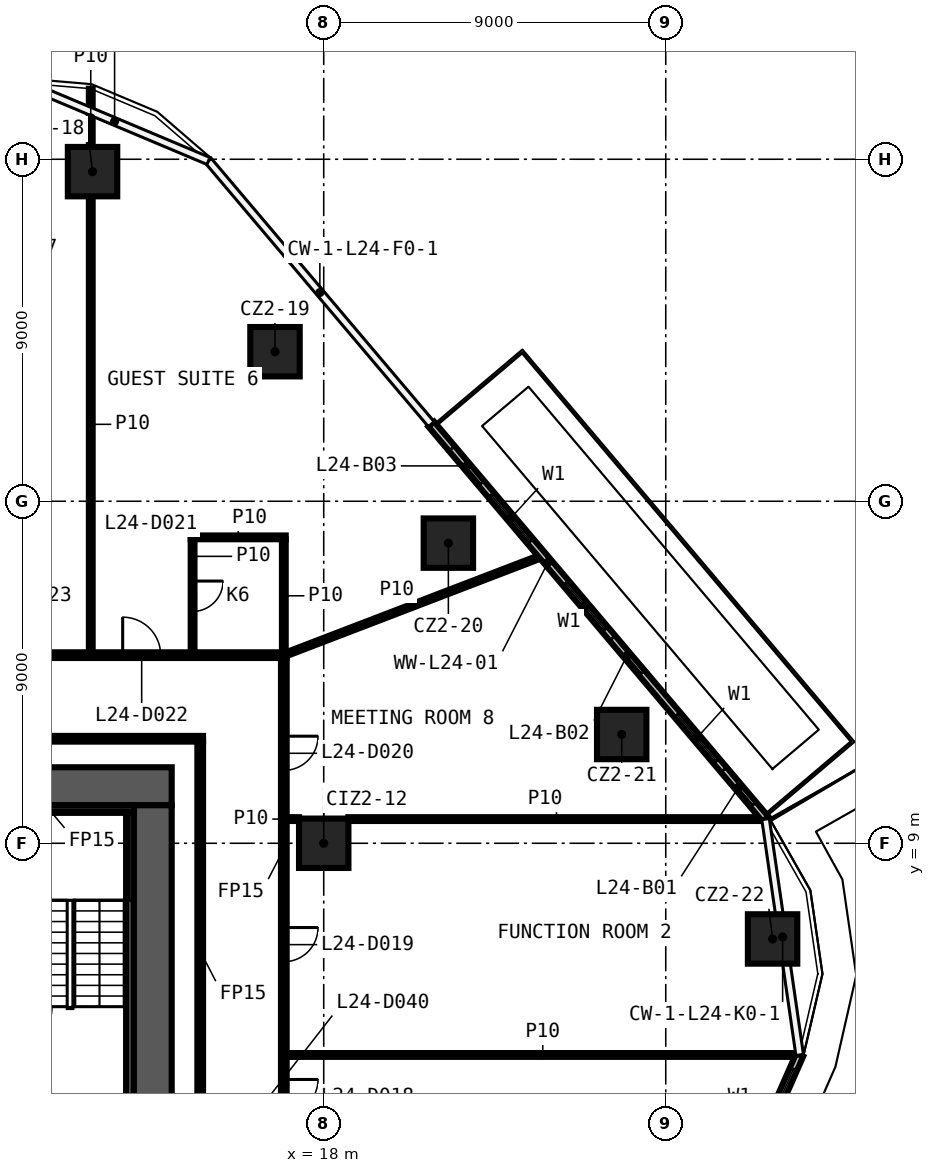
"""IFC4 building model, lengths in metres.
Left out: names, types, materials, properties, quantities, classifications, styles, units other than length and angle.
Written with IfcOpenShell. Run it as: python <this file> out.ifc"""

import sys

from ifc_helpers import new_model, si_unit, direction, frame, frame_2d, origin, origin_2d, place, context, subcontext, project, spatial, rectangle, extrude, element, fill, save


model = new_model("IFC4")
c1 = context("Model", 3, precision=1e-05, world=origin(), true_north=direction((0.0, 1.0)))
c2 = subcontext(c1, "Body", "Model", "MODEL_VIEW")
j1 = project(units=[si_unit("LENGTHUNIT", "METRE"), si_unit("PLANEANGLEUNIT", "RADIAN")], contexts=[c1])
p1 = place(None, origin())
s1 = spatial("IfcSite", under=j1, at=p1, CompositionType="ELEMENT")
p2 = place(p1, origin())
s2 = spatial("IfcBuilding", under=s1, at=p2, CompositionType="ELEMENT")
p3 = place(p2, frame((0.0, 0.0, 113.7)))
s3 = spatial("IfcBuildingStorey", under=s2, at=p3, CompositionType="ELEMENT", Elevation=113.7)
for number, where, z_axis, x_axis in (
    (1, (11.917, 26.674, 0.0), (0.0, 0.0, 1.0), (1.0, 0.0, 0.0)),
    (2, (16.718, 21.935, 0.0), (0.0, 0.0, 1.0), (1.0, 0.0, 0.0)),
    (3, (21.28, 16.898, 0.0), (0.0, 0.0, 1.0), (1.0, 0.0, 0.0)),
    (4, (25.841, 11.862, 0.0), (0.0, 0.0, 1.0), (1.0, 0.0, 0.0)),
    (5, (29.811, 6.482, 0.0), (0.0, 0.0, 1.0), (1.0, 0.0, 0.0)),
    (6, (18.0, 9.0, 0.0), (0.0, 0.0, 1.0), (1.0, 0.0, 0.0)),
):
    element("IfcColumn", number, at=place(p3, frame(where, z_axis=z_axis, x_axis=x_axis)), inside=s3, PredefinedType="COLUMN", context=c2, shape_type="SweptSolid", body=[
        extrude(rectangle(XDim=1.3, YDim=1.3, at=origin_2d()), origin(), (0.0, 0.0, 1.0), 3.3),
    ])
p4 = place(p3, frame((17.025, 3.429, 0.0), z_axis=(0.0, 0.0, 1.0), x_axis=(1.0, 0.0, 0.0)))
e7 = element("IfcWall", 7, at=p4, inside=s3, PredefinedType="PARTITIONING", context=c2, shape_type="SweptSolid", body=[
    extrude(rectangle(XDim=13.477, YDim=0.1, at=frame_2d((6.739, 0.0))), origin(), (0.0, 0.0, 1.0), 3.3),
])
p5 = place(p3, frame((17.025, 9.636, 0.0), z_axis=(0.0, 0.0, 1.0), x_axis=(1.0, 0.0, 0.0)))
e8 = element("IfcWall", 8, at=p5, inside=s3, PredefinedType="PARTITIONING", context=c2, shape_type="SweptSolid", body=[
    extrude(rectangle(XDim=0.325, YDim=0.1, at=frame_2d((0.163, 0.0))), origin(), (0.0, 0.0, 1.0), 3.3),
])
p6 = place(p3, frame((18.65, 9.636, 0.0), z_axis=(0.0, 0.0, 1.0), x_axis=(1.0, 0.0, 0.0)))
e9 = element("IfcWall", 9, at=p6, inside=s3, PredefinedType="PARTITIONING", context=c2, shape_type="SweptSolid", body=[
    extrude(rectangle(XDim=10.95, YDim=0.1, at=frame_2d((5.475, 0.0))), origin(), (0.0, 0.0, 1.0), 3.3),
])
p7 = place(p3, frame((3.6, 11.75, 0.0), z_axis=(0.0, 0.0, 1.0), x_axis=(1.0, 0.0, 0.0)))
e10 = element("IfcWall", 10, at=p7, inside=s3, PredefinedType="PARTITIONING", context=c2, shape_type="SweptSolid", body=[
    extrude(rectangle(XDim=11.225, YDim=0.15, at=frame_2d((5.612, 0.0))), origin(), (0.0, 0.0, 1.0), 3.3),
])
p8 = place(p3, frame((-17.025, 13.95, 0.0), z_axis=(0.0, 0.0, 1.0), x_axis=(1.0, 0.0, 0.0)))
e11 = element("IfcWall", 11, at=p8, inside=s3, PredefinedType="PARTITIONING", context=c2, shape_type="SweptSolid", body=[
    extrude(rectangle(XDim=34.05, YDim=0.15, at=frame_2d((17.025, 0.0))), origin(), (0.0, 0.0, 1.0), 3.3),
])
p9 = place(p8, frame((29.735, 0.0, 0.0)))
e12 = element("IfcOpeningElement", 12, at=p9, cuts=e11, PredefinedType="OPENING", context=c2, shape_type="SweptSolid", body=[
    extrude(rectangle(XDim=1.0, YDim=2.1, at=frame_2d((0.5, 1.05))), frame((0.0, 0.085, 0.0), z_axis=(0.0, -1.0, 0.0), x_axis=(1.0, 0.0, 0.0)), (0.0, 0.0, 1.0), 0.17),
])
p10 = place(p8, frame((25.513, 0.0, 0.0)))
e13 = element("IfcOpeningElement", 13, at=p10, cuts=e11, PredefinedType="OPENING", context=c2, shape_type="SweptSolid", body=[
    extrude(rectangle(XDim=1.0, YDim=2.1, at=frame_2d((0.5, 1.05))), frame((0.0, 0.085, 0.0), z_axis=(0.0, -1.0, 0.0), x_axis=(1.0, 0.0, 0.0)), (0.0, 0.0, 1.0), 0.17),
])
p11 = place(p8, frame((18.631, 0.0, 0.0)))
e14 = element("IfcOpeningElement", 14, at=p11, cuts=e11, PredefinedType="OPENING", context=c2, shape_type="SweptSolid", body=[
    extrude(rectangle(XDim=1.0, YDim=2.1, at=frame_2d((0.5, 1.05))), frame((0.0, 0.085, 0.0), z_axis=(0.0, -1.0, 0.0), x_axis=(1.0, 0.0, 0.0)), (0.0, 0.0, 1.0), 0.17),
])
p12 = place(p8, frame((16.545, 0.0, 0.0)))
e15 = element("IfcOpeningElement", 15, at=p12, cuts=e11, PredefinedType="OPENING", context=c2, shape_type="SweptSolid", body=[
    extrude(rectangle(XDim=1.0, YDim=2.1, at=frame_2d((0.5, 1.05))), frame((0.0, 0.085, 0.0), z_axis=(0.0, -1.0, 0.0), x_axis=(1.0, 0.0, 0.0)), (0.0, 0.0, 1.0), 0.17),
])
p13 = place(p8, frame((9.659, 0.0, 0.0)))
e16 = element("IfcOpeningElement", 16, at=p13, cuts=e11, PredefinedType="OPENING", context=c2, shape_type="SweptSolid", body=[
    extrude(rectangle(XDim=1.0, YDim=2.1, at=frame_2d((0.5, 1.05))), frame((0.0, 0.085, 0.0), z_axis=(0.0, -1.0, 0.0), x_axis=(1.0, 0.0, 0.0)), (0.0, 0.0, 1.0), 0.17),
])
p14 = place(p8, frame((7.577, 0.0, 0.0)))
e17 = element("IfcOpeningElement", 17, at=p14, cuts=e11, PredefinedType="OPENING", context=c2, shape_type="SweptSolid", body=[
    extrude(rectangle(XDim=1.0, YDim=2.1, at=frame_2d((0.5, 1.05))), frame((0.0, 0.085, 0.0), z_axis=(0.0, -1.0, 0.0), x_axis=(1.0, 0.0, 0.0)), (0.0, 0.0, 1.0), 0.17),
])
p15 = place(p8, frame((2.381, 0.0, 0.0)))
e18 = element("IfcOpeningElement", 18, at=p15, cuts=e11, PredefinedType="OPENING", context=c2, shape_type="SweptSolid", body=[
    extrude(rectangle(XDim=0.9, YDim=2.1, at=frame_2d((0.45, 1.05))), frame((0.0, 0.085, 0.0), z_axis=(0.0, -1.0, 0.0), x_axis=(1.0, 0.0, 0.0)), (0.0, 0.0, 1.0), 0.17),
])
p16 = place(p3, frame((14.5, 17.05, 0.0), z_axis=(0.0, 0.0, 1.0), x_axis=(1.0, 0.0, 0.0)))
e19 = element("IfcWall", 19, at=p16, inside=s3, PredefinedType="PARTITIONING", context=c2, shape_type="SweptSolid", body=[
    extrude(rectangle(XDim=2.5, YDim=0.1, at=frame_2d((1.25, 0.0))), origin(), (0.0, 0.0, 1.0), 3.3),
])
p17 = place(p3, frame((16.95, 13.95, 0.0), z_axis=(0.0, 0.0, 1.0), x_axis=(0.933635037811, 0.358225649796, 0.0)))
e20 = element("IfcWall", 20, at=p17, inside=s3, PredefinedType="PARTITIONING", context=c2, shape_type="SweptSolid", body=[
    extrude(rectangle(XDim=7.275, YDim=0.1, at=frame_2d((3.638, 0.0))), origin(), (0.0, 0.0, 1.0), 3.3),
])
p18 = place(p3, frame((16.95, 13.875, 0.0), z_axis=(0.0, 0.0, 1.0), x_axis=(0.0, -1.0, 0.0)))
e21 = element("IfcWall", 21, at=p18, inside=s3, PredefinedType="PARTITIONING", context=c2, shape_type="SweptSolid", body=[
    extrude(rectangle(XDim=27.75, YDim=0.15, at=frame_2d((13.875, 0.0))), origin(), (0.0, 0.0, 1.0), 3.3),
])
p19 = place(p18, frame((24.917, 0.0, 0.0)))
e22 = element("IfcOpeningElement", 22, at=p19, cuts=e21, PredefinedType="OPENING", context=c2, shape_type="SweptSolid", body=[
    extrude(rectangle(XDim=0.9, YDim=2.1, at=frame_2d((0.45, 1.05))), frame((0.0, 0.085, 0.0), z_axis=(0.0, -1.0, 0.0), x_axis=(1.0, 0.0, 0.0)), (0.0, 0.0, 1.0), 0.17),
])
p20 = place(p18, frame((20.086, 0.0, 0.0)))
e23 = element("IfcOpeningElement", 23, at=p20, cuts=e21, PredefinedType="OPENING", context=c2, shape_type="SweptSolid", body=[
    extrude(rectangle(XDim=0.9, YDim=2.1, at=frame_2d((0.45, 1.05))), frame((0.0, 0.085, 0.0), z_axis=(0.0, -1.0, 0.0), x_axis=(1.0, 0.0, 0.0)), (0.0, 0.0, 1.0), 0.17),
])
p21 = place(p18, frame((16.047, 0.0, 0.0)))
e24 = element("IfcOpeningElement", 24, at=p21, cuts=e21, PredefinedType="OPENING", context=c2, shape_type="SweptSolid", body=[
    extrude(rectangle(XDim=0.9, YDim=2.1, at=frame_2d((0.45, 1.05))), frame((0.0, 0.085, 0.0), z_axis=(0.0, -1.0, 0.0), x_axis=(1.0, 0.0, 0.0)), (0.0, 0.0, 1.0), 0.17),
])
p22 = place(p18, frame((11.091, 0.0, 0.0)))
e25 = element("IfcOpeningElement", 25, at=p22, cuts=e21, PredefinedType="OPENING", context=c2, shape_type="SweptSolid", body=[
    extrude(rectangle(XDim=0.9, YDim=2.1, at=frame_2d((0.45, 1.05))), frame((0.0, 0.085, 0.0), z_axis=(0.0, -1.0, 0.0), x_axis=(1.0, 0.0, 0.0)), (0.0, 0.0, 1.0), 0.17),
])
p23 = place(p18, frame((7.093, 0.0, 0.0)))
e26 = element("IfcOpeningElement", 26, at=p23, cuts=e21, PredefinedType="OPENING", context=c2, shape_type="SweptSolid", body=[
    extrude(rectangle(XDim=0.9, YDim=2.1, at=frame_2d((0.45, 1.05))), frame((0.0, 0.085, 0.0), z_axis=(0.0, -1.0, 0.0), x_axis=(1.0, 0.0, 0.0)), (0.0, 0.0, 1.0), 0.17),
])
p24 = place(p18, frame((2.057, 0.0, 0.0)))
e27 = element("IfcOpeningElement", 27, at=p24, cuts=e21, PredefinedType="OPENING", context=c2, shape_type="SweptSolid", body=[
    extrude(rectangle(XDim=0.9, YDim=2.1, at=frame_2d((0.45, 1.05))), frame((0.0, 0.085, 0.0), z_axis=(0.0, -1.0, 0.0), x_axis=(1.0, 0.0, 0.0)), (0.0, 0.0, 1.0), 0.17),
])
p25 = place(p3, frame((16.95, 14.025, 0.0), z_axis=(0.0, 0.0, 1.0), x_axis=(0.0, 1.0, 0.0)))
e28 = element("IfcWall", 28, at=p25, inside=s3, PredefinedType="PARTITIONING", context=c2, shape_type="SweptSolid", body=[
    extrude(rectangle(XDim=2.975, YDim=0.1, at=frame_2d((1.488, 0.0))), origin(), (0.0, 0.0, 1.0), 3.3),
])
p26 = place(p3, frame((14.75, -11.675, 0.0), z_axis=(0.0, 0.0, 1.0), x_axis=(0.0, 1.0, 0.0)))
e29 = element("IfcWall", 29, at=p26, inside=s3, PredefinedType="PARTITIONING", context=c2, shape_type="SweptSolid", body=[
    extrude(rectangle(XDim=23.35, YDim=0.15, at=frame_2d((11.675, 0.0))), origin(), (0.0, 0.0, 1.0), 3.3),
])
p27 = place(p26, frame((11.225, 0.0, 0.0)))
e30 = element("IfcOpeningElement", 30, at=p27, cuts=e29, PredefinedType="OPENING", context=c2, shape_type="SweptSolid", body=[
    extrude(rectangle(XDim=0.9, YDim=2.1, at=frame_2d((0.45, 1.05))), frame((0.0, 0.085, 0.0), z_axis=(0.0, -1.0, 0.0), x_axis=(1.0, 0.0, 0.0)), (0.0, 0.0, 1.0), 0.17),
])
p28 = place(p3, frame((14.55, 17.0, 0.0), z_axis=(0.0, 0.0, 1.0), x_axis=(0.0, -1.0, 0.0)))
e31 = element("IfcWall", 31, at=p28, inside=s3, PredefinedType="PARTITIONING", context=c2, shape_type="SweptSolid", body=[
    extrude(rectangle(XDim=2.975, YDim=0.1, at=frame_2d((1.488, 0.0))), origin(), (0.0, 0.0, 1.0), 3.3),
])
p29 = place(p28, frame((1.1, 0.0, 0.0)))
e32 = element("IfcOpeningElement", 32, at=p29, cuts=e31, PredefinedType="OPENING", context=c2, shape_type="SweptSolid", body=[
    extrude(rectangle(XDim=0.8, YDim=2.1, at=frame_2d((0.4, 1.05))), frame((0.0, 0.06, 0.0), z_axis=(0.0, -1.0, 0.0), x_axis=(1.0, 0.0, 0.0)), (0.0, 0.0, 1.0), 0.12),
])
p30 = place(p3, frame((11.87, 14.025, 0.0), z_axis=(0.0, 0.0, 1.0), x_axis=(0.0, 1.0, 0.0)))
e33 = element("IfcWall", 33, at=p30, inside=s3, PredefinedType="PARTITIONING", context=c2, shape_type="SweptSolid", body=[
    extrude(rectangle(XDim=11.999, YDim=0.1, at=frame_2d((6.0, 0.0))), origin(), (0.0, 0.0, 1.0), 3.3),
])
p31 = place(p3, frame((11.87, 27.324, 0.0), z_axis=(0.0, 0.0, 1.0), x_axis=(0.0, 1.0, 0.0)))
e34 = element("IfcWall", 34, at=p31, inside=s3, PredefinedType="PARTITIONING", context=c2, shape_type="SweptSolid", body=[
    extrude(rectangle(XDim=1.531, YDim=0.1, at=frame_2d((0.766, 0.0))), origin(), (0.0, 0.0, 1.0), 3.3),
])
p32 = place(p3, frame((29.626, 9.636, 0.0), z_axis=(0.0, 0.0, 1.0), x_axis=(-0.6460547702, 0.763291054514, 0.0)))
e35 = element("IfcWall", 35, at=p32, inside=s3, PredefinedType="SOLIDWALL", context=c2, shape_type="SweptSolid", body=[
    extrude(rectangle(XDim=13.615, YDim=0.2, at=frame_2d((6.808, 0.0))), origin(), (0.0, 0.0, 1.0), 3.3),
])
p33 = place(p32, frame((2.0, 0.0, 0.6)))
e36 = element("IfcOpeningElement", 36, at=p33, cuts=e35, PredefinedType="OPENING", context=c2, shape_type="SweptSolid", body=[
    extrude(rectangle(XDim=1.6, YDim=2.4, at=frame_2d((0.8, 1.2))), frame((0.0, 0.11, 0.0), z_axis=(0.0, -1.0, 0.0), x_axis=(1.0, 0.0, 0.0)), (0.0, 0.0, 1.0), 0.22),
])
p34 = place(p32, frame((0.5, 0.0, 0.0)))
e37 = element("IfcOpeningElement", 37, at=p34, cuts=e35, PredefinedType="OPENING", context=c2, shape_type="SweptSolid", body=[
    extrude(rectangle(XDim=1.2, YDim=2.4, at=frame_2d((0.6, 1.2))), frame((0.0, 0.11, 0.0), z_axis=(0.0, -1.0, 0.0), x_axis=(1.0, 0.0, 0.0)), (0.0, 0.0, 1.0), 0.22),
])
p35 = place(p32, frame((6.538, 0.0, 0.6)))
e38 = element("IfcOpeningElement", 38, at=p35, cuts=e35, PredefinedType="OPENING", context=c2, shape_type="SweptSolid", body=[
    extrude(rectangle(XDim=1.6, YDim=2.4, at=frame_2d((0.8, 1.2))), frame((0.0, 0.11, 0.0), z_axis=(0.0, -1.0, 0.0), x_axis=(1.0, 0.0, 0.0)), (0.0, 0.0, 1.0), 0.22),
])
p36 = place(p32, frame((5.038, 0.0, 0.0)))
e39 = element("IfcOpeningElement", 39, at=p36, cuts=e35, PredefinedType="OPENING", context=c2, shape_type="SweptSolid", body=[
    extrude(rectangle(XDim=1.2, YDim=2.4, at=frame_2d((0.6, 1.2))), frame((0.0, 0.11, 0.0), z_axis=(0.0, -1.0, 0.0), x_axis=(1.0, 0.0, 0.0)), (0.0, 0.0, 1.0), 0.22),
])
p37 = place(p32, frame((9.577, 0.0, 0.6)))
e40 = element("IfcOpeningElement", 40, at=p37, cuts=e35, PredefinedType="OPENING", context=c2, shape_type="SweptSolid", body=[
    extrude(rectangle(XDim=1.6, YDim=2.4, at=frame_2d((0.8, 1.2))), frame((0.0, 0.11, 0.0), z_axis=(0.0, -1.0, 0.0), x_axis=(1.0, 0.0, 0.0)), (0.0, 0.0, 1.0), 0.22),
])
p38 = place(p32, frame((11.577, 0.0, 0.0)))
e41 = element("IfcOpeningElement", 41, at=p38, cuts=e35, PredefinedType="OPENING", context=c2, shape_type="SweptSolid", body=[
    extrude(rectangle(XDim=1.2, YDim=2.4, at=frame_2d((0.6, 1.2))), frame((0.0, 0.11, 0.0), z_axis=(0.0, -1.0, 0.0), x_axis=(1.0, 0.0, 0.0)), (0.0, 0.0, 1.0), 0.22),
])
p39 = place(p3, frame((28.748, -0.602, 0.0), z_axis=(0.0, 0.0, 1.0), x_axis=(0.403256746057, 0.91508687935, 0.0)))
e42 = element("IfcWall", 42, at=p39, inside=s3, PredefinedType="SOLIDWALL", context=c2, shape_type="SweptSolid", body=[
    extrude(rectangle(XDim=4.405, YDim=0.2, at=frame_2d((2.203, 0.0))), origin(), (0.0, 0.0, 1.0), 3.3),
])
p40 = place(p39, frame((2.4, 0.0, 0.6)))
e43 = element("IfcOpeningElement", 43, at=p40, cuts=e42, PredefinedType="OPENING", context=c2, shape_type="SweptSolid", body=[
    extrude(rectangle(XDim=1.6, YDim=2.4, at=frame_2d((0.8, 1.2))), frame((0.0, 0.11, 0.0), z_axis=(0.0, -1.0, 0.0), x_axis=(1.0, 0.0, 0.0)), (0.0, 0.0, 1.0), 0.22),
])
p41 = place(p39, frame((0.9, 0.0, 0.0)))
e44 = element("IfcOpeningElement", 44, at=p41, cuts=e42, PredefinedType="OPENING", context=c2, shape_type="SweptSolid", body=[
    extrude(rectangle(XDim=1.2, YDim=2.4, at=frame_2d((0.6, 1.2))), frame((0.0, 0.11, 0.0), z_axis=(0.0, -1.0, 0.0), x_axis=(1.0, 0.0, 0.0)), (0.0, 0.0, 1.0), 0.22),
])
p42 = place(p3, frame((-14.0, 10.5, 0.0), z_axis=(0.0, 0.0, 1.0), x_axis=(1.0, 0.0, 0.0)))
e45 = element("IfcWall", 45, at=p42, inside=s3, PredefinedType="SHEAR", context=c2, shape_type="SweptSolid", body=[
    extrude(rectangle(XDim=28.0, YDim=1.0, at=frame_2d((14.0, 0.0))), origin(), (0.0, 0.0, 1.0), 3.3),
])
p43 = place(p42, frame((15.9, 0.0, 0.0)))
e46 = element("IfcOpeningElement", 46, at=p43, cuts=e45, PredefinedType="OPENING", context=c2, shape_type="SweptSolid", body=[
    extrude(rectangle(XDim=1.6, YDim=2.1, at=frame_2d((0.8, 1.05))), frame((0.0, 0.51, 0.0), z_axis=(0.0, -1.0, 0.0), x_axis=(1.0, 0.0, 0.0)), (0.0, 0.0, 1.0), 1.02),
])
p44 = place(p3, frame((13.5, 10.0, 0.0), z_axis=(0.0, 0.0, 1.0), x_axis=(0.0, -1.0, 0.0)))
e47 = element("IfcWall", 47, at=p44, inside=s3, PredefinedType="SHEAR", context=c2, shape_type="SweptSolid", body=[
    extrude(rectangle(XDim=20.0, YDim=1.0, at=frame_2d((10.0, 0.0))), origin(), (0.0, 0.0, 1.0), 3.3),
])
p45 = place(p3, frame((3.9, 9.9, 0.0), z_axis=(0.0, 0.0, 1.0), x_axis=(1.0, 0.0, 0.0)))
e48 = element("IfcWall", 48, at=p45, inside=s3, PredefinedType="SHEAR", context=c2, shape_type="SweptSolid", body=[
    extrude(rectangle(XDim=9.1, YDim=0.2, at=frame_2d((4.55, 0.0))), origin(), (0.0, 0.0, 1.0), 3.3),
])
p46 = place(p3, frame((12.9, 9.8, 0.0), z_axis=(0.0, 0.0, 1.0), x_axis=(0.0, -1.0, 0.0)))
e49 = element("IfcWall", 49, at=p46, inside=s3, PredefinedType="SHEAR", context=c2, shape_type="SweptSolid", body=[
    extrude(rectangle(XDim=19.6, YDim=0.2, at=frame_2d((9.8, 0.0))), origin(), (0.0, 0.0, 1.0), 3.3),
])
p47 = place(p22, origin())
e50 = element("IfcDoor", 50, at=p47, inside=s3, OperationType="SINGLE_SWING_LEFT", PredefinedType="DOOR", context=c2, shape_type="SweptSolid", body=[
    extrude(rectangle(XDim=0.9, YDim=2.1, at=frame_2d((0.45, 1.05))), frame((0.0, 0.025, 0.0), z_axis=(0.0, -1.0, 0.0), x_axis=(1.0, 0.0, 0.0)), (0.0, 0.0, 1.0), 0.05),
])
fill(e25, e50)
p48 = place(p23, origin())
e51 = element("IfcDoor", 51, at=p48, inside=s3, OperationType="SINGLE_SWING_RIGHT", PredefinedType="DOOR", context=c2, shape_type="SweptSolid", body=[
    extrude(rectangle(XDim=0.9, YDim=2.1, at=frame_2d((0.45, 1.05))), frame((0.0, 0.025, 0.0), z_axis=(0.0, -1.0, 0.0), x_axis=(1.0, 0.0, 0.0)), (0.0, 0.0, 1.0), 0.05),
])
fill(e26, e51)
p49 = place(p24, origin())
e52 = element("IfcDoor", 52, at=p49, inside=s3, OperationType="SINGLE_SWING_LEFT", PredefinedType="DOOR", context=c2, shape_type="SweptSolid", body=[
    extrude(rectangle(XDim=0.9, YDim=2.1, at=frame_2d((0.45, 1.05))), frame((0.0, 0.025, 0.0), z_axis=(0.0, -1.0, 0.0), x_axis=(1.0, 0.0, 0.0)), (0.0, 0.0, 1.0), 0.05),
])
fill(e27, e52)
p50 = place(p29, origin())
e53 = element("IfcDoor", 53, at=p50, inside=s3, OperationType="SINGLE_SWING_LEFT", PredefinedType="DOOR", context=c2, shape_type="SweptSolid", body=[
    extrude(rectangle(XDim=0.8, YDim=2.1, at=frame_2d((0.4, 1.05))), frame((0.0, 0.025, 0.0), z_axis=(0.0, -1.0, 0.0), x_axis=(1.0, 0.0, 0.0)), (0.0, 0.0, 1.0), 0.05),
])
fill(e32, e53)
p51 = place(p9, origin())
e54 = element("IfcDoor", 54, at=p51, inside=s3, OperationType="SINGLE_SWING_RIGHT", PredefinedType="DOOR", context=c2, shape_type="SweptSolid", body=[
    extrude(rectangle(XDim=1.0, YDim=2.1, at=frame_2d((0.5, 1.05))), frame((0.0, 0.025, 0.0), z_axis=(0.0, -1.0, 0.0), x_axis=(1.0, 0.0, 0.0)), (0.0, 0.0, 1.0), 0.05),
])
fill(e12, e54)
p52 = place(p33, origin())
e55 = element("IfcWindow", 55, at=p52, inside=s3, PartitioningType="SINGLE_PANEL", PredefinedType="WINDOW", context=c2, shape_type="SweptSolid", body=[
    extrude(rectangle(XDim=1.6, YDim=2.4, at=frame_2d((0.8, 1.2))), frame((0.0, 0.03, 0.0), z_axis=(0.0, -1.0, 0.0), x_axis=(1.0, 0.0, 0.0)), (0.0, 0.0, 1.0), 0.06),
])
fill(e36, e55)
p53 = place(p34, origin())
e56 = element("IfcDoor", 56, at=p53, inside=s3, OperationType="SLIDING_TO_LEFT", PredefinedType="DOOR", context=c2, shape_type="SweptSolid", body=[
    extrude(rectangle(XDim=1.2, YDim=2.4, at=frame_2d((0.6, 1.2))), frame((0.0, 0.025, 0.0), z_axis=(0.0, -1.0, 0.0), x_axis=(1.0, 0.0, 0.0)), (0.0, 0.0, 1.0), 0.05),
])
fill(e37, e56)
p54 = place(p35, origin())
e57 = element("IfcWindow", 57, at=p54, inside=s3, PartitioningType="SINGLE_PANEL", PredefinedType="WINDOW", context=c2, shape_type="SweptSolid", body=[
    extrude(rectangle(XDim=1.6, YDim=2.4, at=frame_2d((0.8, 1.2))), frame((0.0, 0.03, 0.0), z_axis=(0.0, -1.0, 0.0), x_axis=(1.0, 0.0, 0.0)), (0.0, 0.0, 1.0), 0.06),
])
fill(e38, e57)
p55 = place(p36, origin())
e58 = element("IfcDoor", 58, at=p55, inside=s3, OperationType="SLIDING_TO_LEFT", PredefinedType="DOOR", context=c2, shape_type="SweptSolid", body=[
    extrude(rectangle(XDim=1.2, YDim=2.4, at=frame_2d((0.6, 1.2))), frame((0.0, 0.025, 0.0), z_axis=(0.0, -1.0, 0.0), x_axis=(1.0, 0.0, 0.0)), (0.0, 0.0, 1.0), 0.05),
])
fill(e39, e58)
p56 = place(p37, origin())
e59 = element("IfcWindow", 59, at=p56, inside=s3, PartitioningType="SINGLE_PANEL", PredefinedType="WINDOW", context=c2, shape_type="SweptSolid", body=[
    extrude(rectangle(XDim=1.6, YDim=2.4, at=frame_2d((0.8, 1.2))), frame((0.0, 0.03, 0.0), z_axis=(0.0, -1.0, 0.0), x_axis=(1.0, 0.0, 0.0)), (0.0, 0.0, 1.0), 0.06),
])
fill(e40, e59)
p57 = place(p38, origin())
e60 = element("IfcDoor", 60, at=p57, inside=s3, OperationType="SLIDING_TO_LEFT", PredefinedType="DOOR", context=c2, shape_type="SweptSolid", body=[
    extrude(rectangle(XDim=1.2, YDim=2.4, at=frame_2d((0.6, 1.2))), frame((0.0, 0.025, 0.0), z_axis=(0.0, -1.0, 0.0), x_axis=(1.0, 0.0, 0.0)), (0.0, 0.0, 1.0), 0.05),
])
fill(e41, e60)
p58 = place(p40, origin())
e61 = element("IfcWindow", 61, at=p58, inside=s3, PartitioningType="SINGLE_PANEL", PredefinedType="WINDOW", context=c2, shape_type="SweptSolid", body=[
    extrude(rectangle(XDim=1.6, YDim=2.4, at=frame_2d((0.8, 1.2))), frame((0.0, 0.03, 0.0), z_axis=(0.0, -1.0, 0.0), x_axis=(1.0, 0.0, 0.0)), (0.0, 0.0, 1.0), 0.06),
])
fill(e43, e61)
save(model, sys.argv[1])
